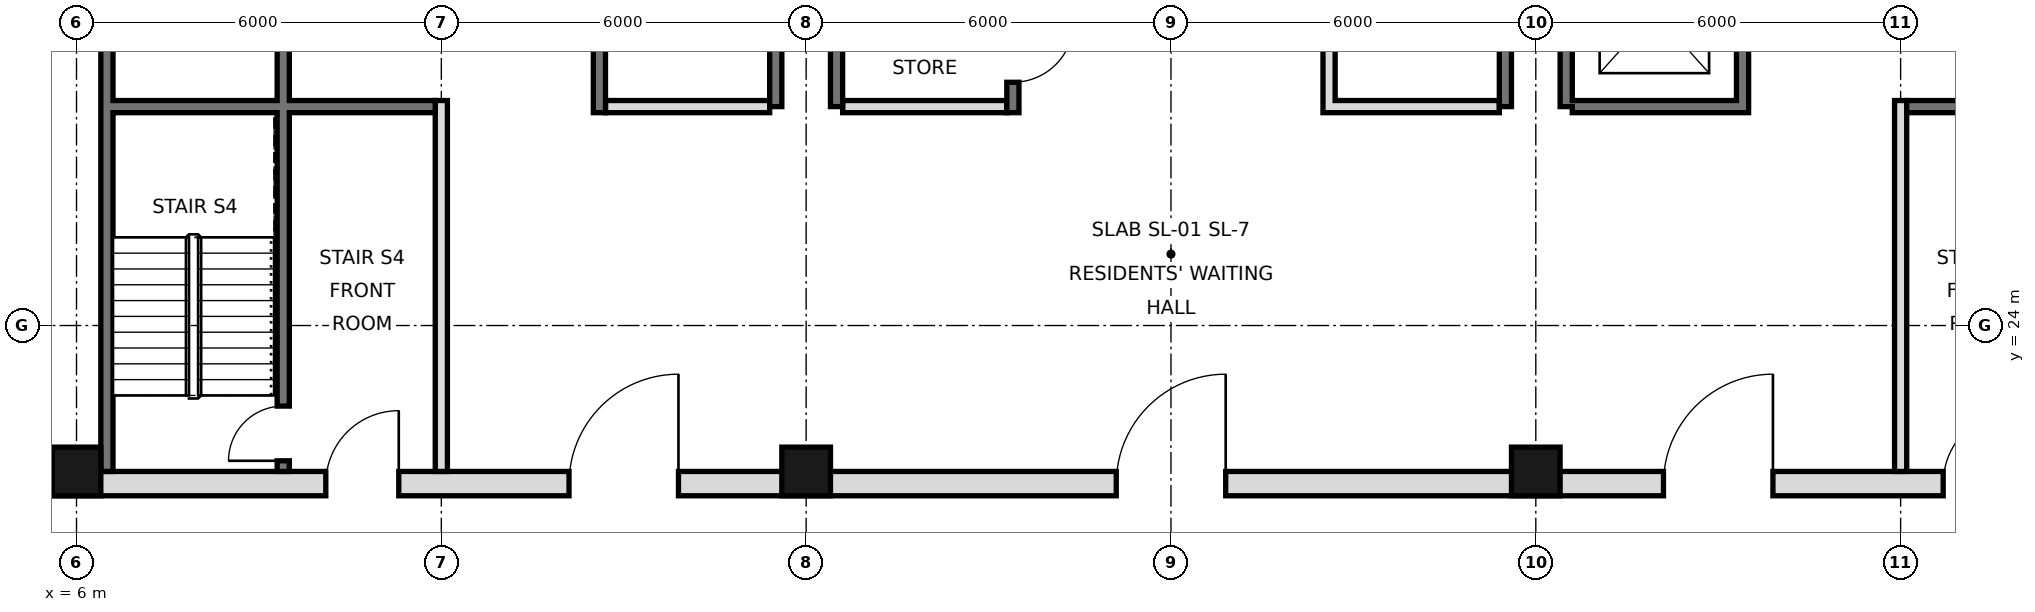
"""IFC4 building model, lengths in metres.
Left out: names, types, materials, properties, quantities, classifications, styles, units other than length and angle.
Written with IfcOpenShell. Run it as: python <this file> out.ifc"""

import sys

from ifc_helpers import new_model, si_unit, direction, frame, frame_2d, origin, origin_2d, place, context, subcontext, project, spatial, rectangle, hollow_rectangle, extrude, element, fill, save


model = new_model("IFC4")
c1 = context("Model", 3, precision=1e-05, world=origin(), true_north=direction((0.0, 1.0)))
c2 = subcontext(c1, "Body", "Model", "MODEL_VIEW")
j1 = project(units=[si_unit("LENGTHUNIT", "METRE"), si_unit("PLANEANGLEUNIT", "RADIAN")], contexts=[c1])
p1 = place(None, origin())
s1 = spatial("IfcSite", under=j1, at=p1, CompositionType="ELEMENT")
p2 = place(p1, origin())
s2 = spatial("IfcBuilding", under=s1, at=p2, CompositionType="ELEMENT")
p3 = place(p2, frame((0.0, 0.0, 298.0)))
s3 = spatial("IfcBuildingStorey", under=s2, at=p3, CompositionType="ELEMENT", Elevation=298.0)
for number, where, z_axis, x_axis in (
    (1, (6.0, 21.6, 0.0), (0.0, 0.0, 1.0), (1.0, 0.0, 0.0)),
    (2, (18.0, 21.6, 0.0), (0.0, 0.0, 1.0), (1.0, 0.0, 0.0)),
    (3, (30.0, 21.6, 0.0), (0.0, 0.0, 1.0), (1.0, 0.0, 0.0)),
):
    element("IfcColumn", number, at=place(p3, frame(where, z_axis=z_axis, x_axis=x_axis)), inside=s3, PredefinedType="COLUMN", context=c2, shape_type="SweptSolid", body=[
        extrude(hollow_rectangle(XDim=0.8, YDim=0.8, WallThickness=0.032, at=origin_2d()), origin(), (0.0, 0.0, 1.0), 3.6),
    ])
p4 = place(p3, frame((6.5, 21.6, 0.0), z_axis=(0.0, 0.0, 1.0), x_axis=(0.0, 1.0, 0.0)))
e4 = element("IfcWall", 4, at=p4, inside=s3, PredefinedType="SOLIDWALL", context=c2, shape_type="SweptSolid", body=[
    extrude(rectangle(XDim=23.5, YDim=0.2, at=frame_2d((11.75, 0.0))), origin(), (0.0, 0.0, 1.0), 3.42),
])
for number, where, z_axis, x_axis in (
    (5, (17.5, 27.6, 0.0), (0.0, 0.0, 1.0), (0.0, 1.0, 0.0)),
    (6, (18.5, 27.6, 0.0), (0.0, 0.0, 1.0), (0.0, 1.0, 0.0)),
    (7, (29.5, 27.6, 0.0), (0.0, 0.0, 1.0), (0.0, 1.0, 0.0)),
    (8, (30.5, 27.6, 0.0), (0.0, 0.0, 1.0), (0.0, 1.0, 0.0)),
):
    element("IfcWall", number, at=place(p3, frame(where, z_axis=z_axis, x_axis=x_axis)), inside=s3, PredefinedType="SOLIDWALL", context=c2, shape_type="SweptSolid", body=[
        extrude(rectangle(XDim=17.5, YDim=0.2, at=frame_2d((8.75, 0.0))), origin(), (0.0, 0.0, 1.0), 3.42),
    ])
p5 = place(p3, frame((5.6, 21.4, 0.0), z_axis=(0.0, 0.0, 1.0), x_axis=(1.0, 0.0, 0.0)))
e9 = element("IfcWall", 9, at=p5, inside=s3, PredefinedType="SOLIDWALL", context=c2, shape_type="SweptSolid", body=[
    extrude(rectangle(XDim=36.8, YDim=0.4, at=frame_2d((18.4, 0.0))), origin(), (0.0, 0.0, 1.0), 3.42),
])
p6 = place(p5, frame((8.5, 0.0, 0.0)))
e10 = element("IfcOpeningElement", 10, at=p6, cuts=e9, PredefinedType="OPENING", context=c2, shape_type="SweptSolid", body=[
    extrude(rectangle(XDim=1.8, YDim=2.1, at=frame_2d((0.9, 1.05))), frame((0.0, 0.21, 0.0), z_axis=(0.0, -1.0, 0.0), x_axis=(1.0, 0.0, 0.0)), (0.0, 0.0, 1.0), 0.42),
])
p7 = place(p5, frame((17.5, 0.0, 0.0)))
e11 = element("IfcOpeningElement", 11, at=p7, cuts=e9, PredefinedType="OPENING", context=c2, shape_type="SweptSolid", body=[
    extrude(rectangle(XDim=1.8, YDim=2.1, at=frame_2d((0.9, 1.05))), frame((0.0, 0.21, 0.0), z_axis=(0.0, -1.0, 0.0), x_axis=(1.0, 0.0, 0.0)), (0.0, 0.0, 1.0), 0.42),
])
p8 = place(p5, frame((26.5, 0.0, 0.0)))
e12 = element("IfcOpeningElement", 12, at=p8, cuts=e9, PredefinedType="OPENING", context=c2, shape_type="SweptSolid", body=[
    extrude(rectangle(XDim=1.8, YDim=2.1, at=frame_2d((0.9, 1.05))), frame((0.0, 0.21, 0.0), z_axis=(0.0, -1.0, 0.0), x_axis=(1.0, 0.0, 0.0)), (0.0, 0.0, 1.0), 0.42),
])
p9 = place(p5, frame((4.5, 0.0, 0.0)))
e13 = element("IfcOpeningElement", 13, at=p9, cuts=e9, PredefinedType="OPENING", context=c2, shape_type="SweptSolid", body=[
    extrude(rectangle(XDim=1.2, YDim=2.1, at=frame_2d((0.6, 1.05))), frame((0.0, 0.21, 0.0), z_axis=(0.0, -1.0, 0.0), x_axis=(1.0, 0.0, 0.0)), (0.0, 0.0, 1.0), 0.42),
])
p10 = place(p5, frame((31.1, 0.0, 0.0)))
e14 = element("IfcOpeningElement", 14, at=p10, cuts=e9, PredefinedType="OPENING", context=c2, shape_type="SweptSolid", body=[
    extrude(rectangle(XDim=1.2, YDim=2.1, at=frame_2d((0.6, 1.05))), frame((0.0, 0.21, 0.0), z_axis=(0.0, -1.0, 0.0), x_axis=(1.0, 0.0, 0.0)), (0.0, 0.0, 1.0), 0.42),
])
p11 = place(p3, frame((12.0, 21.6, 0.0), z_axis=(0.0, 0.0, 1.0), x_axis=(0.0, 1.0, 0.0)))
e15 = element("IfcWall", 15, at=p11, inside=s3, PredefinedType="PARTITIONING", context=c2, shape_type="SweptSolid", body=[
    extrude(rectangle(XDim=6.1, YDim=0.2, at=frame_2d((3.05, 0.0))), origin(), (0.0, 0.0, 1.0), 3.42),
])
p12 = place(p3, frame((14.6, 27.5, 0.0), z_axis=(0.0, 0.0, 1.0), x_axis=(0.0, 1.0, 0.0)))
e16 = element("IfcWall", 16, at=p12, inside=s3, PredefinedType="SOLIDWALL", context=c2, shape_type="SweptSolid", body=[
    extrude(rectangle(XDim=17.5, YDim=0.2, at=frame_2d((8.75, 0.0))), origin(), (0.0, 0.0, 1.0), 3.42),
])
p13 = place(p12, frame((15.4, 0.0, 0.0)))
e17 = element("IfcOpeningElement", 17, at=p13, cuts=e16, PredefinedType="OPENING", context=c2, shape_type="SweptSolid", body=[
    extrude(rectangle(XDim=1.1, YDim=2.1, at=frame_2d((0.55, 1.05))), frame((0.0, 0.11, 0.0), z_axis=(0.0, -1.0, 0.0), x_axis=(1.0, 0.0, 0.0)), (0.0, 0.0, 1.0), 0.22),
])
p14 = place(p12, frame((2.7, 0.0, 0.0)))
e18 = element("IfcOpeningElement", 18, at=p14, cuts=e16, PredefinedType="OPENING", context=c2, shape_type="SweptSolid", body=[
    extrude(rectangle(XDim=1.0, YDim=2.1, at=frame_2d((0.5, 1.05))), frame((0.0, 0.11, 0.0), z_axis=(0.0, -1.0, 0.0), x_axis=(1.0, 0.0, 0.0)), (0.0, 0.0, 1.0), 0.22),
])
p15 = place(p12, frame((9.9, 0.0, 0.0)))
e19 = element("IfcOpeningElement", 19, at=p15, cuts=e16, PredefinedType="OPENING", context=c2, shape_type="SweptSolid", body=[
    extrude(rectangle(XDim=0.9, YDim=2.1, at=frame_2d((0.45, 1.05))), frame((0.0, 0.11, 0.0), z_axis=(0.0, -1.0, 0.0), x_axis=(1.0, 0.0, 0.0)), (0.0, 0.0, 1.0), 0.22),
])
p16 = place(p3, frame((21.4, 27.5, 0.0), z_axis=(0.0, 0.0, 1.0), x_axis=(0.0, 1.0, 0.0)))
e20 = element("IfcWall", 20, at=p16, inside=s3, PredefinedType="SOLIDWALL", context=c2, shape_type="SweptSolid", body=[
    extrude(rectangle(XDim=17.5, YDim=0.2, at=frame_2d((8.75, 0.0))), origin(), (0.0, 0.0, 1.0), 3.42),
])
p17 = place(p16, frame((0.5, 0.0, 0.0)))
e21 = element("IfcOpeningElement", 21, at=p17, cuts=e20, PredefinedType="OPENING", context=c2, shape_type="SweptSolid", body=[
    extrude(rectangle(XDim=1.0, YDim=2.1, at=frame_2d((0.5, 1.05))), frame((0.0, 0.11, 0.0), z_axis=(0.0, -1.0, 0.0), x_axis=(1.0, 0.0, 0.0)), (0.0, 0.0, 1.0), 0.22),
])
p18 = place(p16, frame((3.6, 0.0, 0.0)))
e22 = element("IfcOpeningElement", 22, at=p18, cuts=e20, PredefinedType="OPENING", context=c2, shape_type="SweptSolid", body=[
    extrude(rectangle(XDim=1.0, YDim=2.1, at=frame_2d((0.5, 1.05))), frame((0.0, 0.11, 0.0), z_axis=(0.0, -1.0, 0.0), x_axis=(1.0, 0.0, 0.0)), (0.0, 0.0, 1.0), 0.22),
])
p19 = place(p16, frame((16.2, 0.0, 0.0)))
e23 = element("IfcOpeningElement", 23, at=p19, cuts=e20, PredefinedType="OPENING", context=c2, shape_type="SweptSolid", body=[
    extrude(rectangle(XDim=1.0, YDim=2.1, at=frame_2d((0.5, 1.05))), frame((0.0, 0.11, 0.0), z_axis=(0.0, -1.0, 0.0), x_axis=(1.0, 0.0, 0.0)), (0.0, 0.0, 1.0), 0.22),
])
p20 = place(p16, frame((7.4, 0.0, 0.0)))
e24 = element("IfcOpeningElement", 24, at=p20, cuts=e20, PredefinedType="OPENING", context=c2, shape_type="SweptSolid", body=[
    extrude(rectangle(XDim=0.9, YDim=2.1, at=frame_2d((0.45, 1.05))), frame((0.0, 0.11, 0.0), z_axis=(0.0, -1.0, 0.0), x_axis=(1.0, 0.0, 0.0)), (0.0, 0.0, 1.0), 0.22),
])
p21 = place(p3, frame((26.6, 27.5, 0.0), z_axis=(0.0, 0.0, 1.0), x_axis=(0.0, 1.0, 0.0)))
e25 = element("IfcWall", 25, at=p21, inside=s3, PredefinedType="SOLIDWALL", context=c2, shape_type="SweptSolid", body=[
    extrude(rectangle(XDim=17.5, YDim=0.2, at=frame_2d((8.75, 0.0))), origin(), (0.0, 0.0, 1.0), 3.42),
])
p22 = place(p21, frame((4.3, 0.0, 0.0)))
e26 = element("IfcOpeningElement", 26, at=p22, cuts=e25, PredefinedType="OPENING", context=c2, shape_type="SweptSolid", body=[
    extrude(rectangle(XDim=0.9, YDim=2.1, at=frame_2d((0.45, 1.05))), frame((0.0, 0.11, 0.0), z_axis=(0.0, -1.0, 0.0), x_axis=(1.0, 0.0, 0.0)), (0.0, 0.0, 1.0), 0.22),
])
p23 = place(p21, frame((10.35, 0.0, 0.0)))
e27 = element("IfcOpeningElement", 27, at=p23, cuts=e25, PredefinedType="OPENING", context=c2, shape_type="SweptSolid", body=[
    extrude(rectangle(XDim=1.0, YDim=2.1, at=frame_2d((0.5, 1.05))), frame((0.0, 0.11, 0.0), z_axis=(0.0, -1.0, 0.0), x_axis=(1.0, 0.0, 0.0)), (0.0, 0.0, 1.0), 0.22),
])
p24 = place(p21, frame((14.575, 0.0, 0.0)))
e28 = element("IfcOpeningElement", 28, at=p24, cuts=e25, PredefinedType="OPENING", context=c2, shape_type="SweptSolid", body=[
    extrude(rectangle(XDim=1.0, YDim=2.1, at=frame_2d((0.5, 1.05))), frame((0.0, 0.11, 0.0), z_axis=(0.0, -1.0, 0.0), x_axis=(1.0, 0.0, 0.0)), (0.0, 0.0, 1.0), 0.22),
])
p25 = place(p3, frame((33.4, 27.5, 0.0), z_axis=(0.0, 0.0, 1.0), x_axis=(0.0, 1.0, 0.0)))
e29 = element("IfcWall", 29, at=p25, inside=s3, PredefinedType="SOLIDWALL", context=c2, shape_type="SweptSolid", body=[
    extrude(rectangle(XDim=17.5, YDim=0.2, at=frame_2d((8.75, 0.0))), origin(), (0.0, 0.0, 1.0), 3.42),
])
p26 = place(p25, frame((1.1, 0.0, 0.0)))
e30 = element("IfcOpeningElement", 30, at=p26, cuts=e29, PredefinedType="OPENING", context=c2, shape_type="SweptSolid", body=[
    extrude(rectangle(XDim=1.1, YDim=2.1, at=frame_2d((0.55, 1.05))), frame((0.0, 0.11, 0.0), z_axis=(0.0, -1.0, 0.0), x_axis=(1.0, 0.0, 0.0)), (0.0, 0.0, 1.0), 0.22),
])
p27 = place(p25, frame((4.2, 0.0, 0.0)))
e31 = element("IfcOpeningElement", 31, at=p27, cuts=e29, PredefinedType="OPENING", context=c2, shape_type="SweptSolid", body=[
    extrude(rectangle(XDim=1.1, YDim=2.1, at=frame_2d((0.55, 1.05))), frame((0.0, 0.11, 0.0), z_axis=(0.0, -1.0, 0.0), x_axis=(1.0, 0.0, 0.0)), (0.0, 0.0, 1.0), 0.22),
])
p28 = place(p25, frame((15.4, 0.0, 0.0)))
e32 = element("IfcOpeningElement", 32, at=p28, cuts=e29, PredefinedType="OPENING", context=c2, shape_type="SweptSolid", body=[
    extrude(rectangle(XDim=1.1, YDim=2.1, at=frame_2d((0.55, 1.05))), frame((0.0, 0.11, 0.0), z_axis=(0.0, -1.0, 0.0), x_axis=(1.0, 0.0, 0.0)), (0.0, 0.0, 1.0), 0.22),
])
p29 = place(p25, frame((9.9, 0.0, 0.0)))
e33 = element("IfcOpeningElement", 33, at=p29, cuts=e29, PredefinedType="OPENING", context=c2, shape_type="SweptSolid", body=[
    extrude(rectangle(XDim=0.9, YDim=2.1, at=frame_2d((0.45, 1.05))), frame((0.0, 0.11, 0.0), z_axis=(0.0, -1.0, 0.0), x_axis=(1.0, 0.0, 0.0)), (0.0, 0.0, 1.0), 0.22),
])
p30 = place(p3, frame((36.0, 21.6, 0.0), z_axis=(0.0, 0.0, 1.0), x_axis=(0.0, 1.0, 0.0)))
e34 = element("IfcWall", 34, at=p30, inside=s3, PredefinedType="PARTITIONING", context=c2, shape_type="SweptSolid", body=[
    extrude(rectangle(XDim=6.1, YDim=0.2, at=frame_2d((3.05, 0.0))), origin(), (0.0, 0.0, 1.0), 3.42),
])
p31 = place(p3, frame((9.4, 21.6, 0.0), z_axis=(0.0, 0.0, 1.0), x_axis=(0.0, 1.0, 0.0)))
e35 = element("IfcWall", 35, at=p31, inside=s3, PredefinedType="SOLIDWALL", context=c2, shape_type="SweptSolid", body=[
    extrude(rectangle(XDim=23.4, YDim=0.2, at=frame_2d((11.7, 0.0))), origin(), (0.0, 0.0, 1.0), 3.42),
])
p32 = place(p31, frame((7.7, 0.0, 0.0)))
e36 = element("IfcOpeningElement", 36, at=p32, cuts=e35, PredefinedType="OPENING", context=c2, shape_type="SweptSolid", body=[
    extrude(rectangle(XDim=1.0, YDim=2.1, at=frame_2d((0.5, 1.05))), frame((0.0, 0.11, 0.0), z_axis=(0.0, -1.0, 0.0), x_axis=(1.0, 0.0, 0.0)), (0.0, 0.0, 1.0), 0.22),
])
p33 = place(p31, frame((12.35, 0.0, 0.0)))
e37 = element("IfcOpeningElement", 37, at=p33, cuts=e35, PredefinedType="OPENING", context=c2, shape_type="SweptSolid", body=[
    extrude(rectangle(XDim=1.0, YDim=2.1, at=frame_2d((0.5, 1.05))), frame((0.0, 0.11, 0.0), z_axis=(0.0, -1.0, 0.0), x_axis=(1.0, 0.0, 0.0)), (0.0, 0.0, 1.0), 0.22),
])
p34 = place(p31, frame((22.1, 0.0, 0.0)))
e38 = element("IfcOpeningElement", 38, at=p34, cuts=e35, PredefinedType="OPENING", context=c2, shape_type="SweptSolid", body=[
    extrude(rectangle(XDim=1.0, YDim=2.1, at=frame_2d((0.5, 1.05))), frame((0.0, 0.11, 0.0), z_axis=(0.0, -1.0, 0.0), x_axis=(1.0, 0.0, 0.0)), (0.0, 0.0, 1.0), 0.22),
])
p35 = place(p31, frame((0.175, 0.0, 0.0)))
e39 = element("IfcOpeningElement", 39, at=p35, cuts=e35, PredefinedType="OPENING", context=c2, shape_type="SweptSolid", body=[
    extrude(rectangle(XDim=0.9, YDim=2.1, at=frame_2d((0.45, 1.05))), frame((0.0, 0.11, 0.0), z_axis=(0.0, -1.0, 0.0), x_axis=(1.0, 0.0, 0.0)), (0.0, 0.0, 1.0), 0.22),
])
for number, where, z_axis, x_axis in (
    (40, (14.7, 27.6, 0.0), (0.0, 0.0, 1.0), (1.0, 0.0, 0.0)),
    (41, (18.6, 27.6, 0.0), (0.0, 0.0, 1.0), (1.0, 0.0, 0.0)),
):
    element("IfcWall", number, at=place(p3, frame(where, z_axis=z_axis, x_axis=x_axis)), inside=s3, PredefinedType="PARTITIONING", context=c2, shape_type="SweptSolid", body=[
        extrude(rectangle(XDim=2.7, YDim=0.2, at=frame_2d((1.35, 0.0))), origin(), (0.0, 0.0, 1.0), 3.42),
    ])
for number, where, z_axis, x_axis in (
    (42, (26.7, 27.6, 0.0), (0.0, 0.0, 1.0), (1.0, 0.0, 0.0)),
    (43, (30.6, 27.6, 0.0), (0.0, 0.0, 1.0), (1.0, 0.0, 0.0)),
):
    element("IfcWall", number, at=place(p3, frame(where, z_axis=z_axis, x_axis=x_axis)), inside=s3, PredefinedType="SOLIDWALL", context=c2, shape_type="SweptSolid", body=[
        extrude(rectangle(XDim=2.7, YDim=0.2, at=frame_2d((1.35, 0.0))), origin(), (0.0, 0.0, 1.0), 3.42),
    ])
for number, where, z_axis, x_axis in (
    (44, (36.1, 27.6, 0.0), (0.0, 0.0, 1.0), (1.0, 0.0, 0.0)),
    (45, (6.6, 27.6, 0.0), (0.0, 0.0, 1.0), (1.0, 0.0, 0.0)),
):
    element("IfcWall", number, at=place(p3, frame(where, z_axis=z_axis, x_axis=x_axis)), inside=s3, PredefinedType="SOLIDWALL", context=c2, shape_type="SweptSolid", body=[
        extrude(rectangle(XDim=5.3, YDim=0.2, at=frame_2d((2.65, 0.0))), origin(), (0.0, 0.0, 1.0), 3.42),
    ])
p36 = place(p6, frame((1.8, 0.0, 0.0), z_axis=(0.0, 0.0, 1.0), x_axis=(-1.0, 0.0, 0.0)))
e46 = element("IfcDoor", 46, at=p36, inside=s3, OperationType="SINGLE_SWING_LEFT", PredefinedType="DOOR", context=c2, shape_type="SweptSolid", body=[
    extrude(rectangle(XDim=1.8, YDim=2.1, at=frame_2d((0.9, 1.05))), frame((0.0, 0.025, 0.0), z_axis=(0.0, -1.0, 0.0), x_axis=(1.0, 0.0, 0.0)), (0.0, 0.0, 1.0), 0.05),
])
fill(e10, e46)
p37 = place(p7, frame((1.8, 0.0, 0.0), z_axis=(0.0, 0.0, 1.0), x_axis=(-1.0, 0.0, 0.0)))
e47 = element("IfcDoor", 47, at=p37, inside=s3, OperationType="SINGLE_SWING_LEFT", PredefinedType="DOOR", context=c2, shape_type="SweptSolid", body=[
    extrude(rectangle(XDim=1.8, YDim=2.1, at=frame_2d((0.9, 1.05))), frame((0.0, 0.025, 0.0), z_axis=(0.0, -1.0, 0.0), x_axis=(1.0, 0.0, 0.0)), (0.0, 0.0, 1.0), 0.05),
])
fill(e11, e47)
p38 = place(p8, frame((1.8, 0.0, 0.0), z_axis=(0.0, 0.0, 1.0), x_axis=(-1.0, 0.0, 0.0)))
e48 = element("IfcDoor", 48, at=p38, inside=s3, OperationType="SINGLE_SWING_LEFT", PredefinedType="DOOR", context=c2, shape_type="SweptSolid", body=[
    extrude(rectangle(XDim=1.8, YDim=2.1, at=frame_2d((0.9, 1.05))), frame((0.0, 0.025, 0.0), z_axis=(0.0, -1.0, 0.0), x_axis=(1.0, 0.0, 0.0)), (0.0, 0.0, 1.0), 0.05),
])
fill(e12, e48)
p39 = place(p9, frame((1.2, 0.0, 0.0), z_axis=(0.0, 0.0, 1.0), x_axis=(-1.0, 0.0, 0.0)))
e49 = element("IfcDoor", 49, at=p39, inside=s3, OperationType="SINGLE_SWING_LEFT", PredefinedType="DOOR", context=c2, shape_type="SweptSolid", body=[
    extrude(rectangle(XDim=1.2, YDim=2.1, at=frame_2d((0.6, 1.05))), frame((0.0, 0.025, 0.0), z_axis=(0.0, -1.0, 0.0), x_axis=(1.0, 0.0, 0.0)), (0.0, 0.0, 1.0), 0.05),
])
fill(e13, e49)
p40 = place(p10, frame((1.2, 0.0, 0.0), z_axis=(0.0, 0.0, 1.0), x_axis=(-1.0, 0.0, 0.0)))
e50 = element("IfcDoor", 50, at=p40, inside=s3, OperationType="SINGLE_SWING_LEFT", PredefinedType="DOOR", context=c2, shape_type="SweptSolid", body=[
    extrude(rectangle(XDim=1.2, YDim=2.1, at=frame_2d((0.6, 1.05))), frame((0.0, 0.025, 0.0), z_axis=(0.0, -1.0, 0.0), x_axis=(1.0, 0.0, 0.0)), (0.0, 0.0, 1.0), 0.05),
])
fill(e14, e50)
p41 = place(p17, origin())
e51 = element("IfcDoor", 51, at=p41, inside=s3, OperationType="SINGLE_SWING_RIGHT", PredefinedType="DOOR", context=c2, shape_type="SweptSolid", body=[
    extrude(rectangle(XDim=1.0, YDim=2.1, at=frame_2d((0.5, 1.05))), frame((0.0, 0.025, 0.0), z_axis=(0.0, -1.0, 0.0), x_axis=(1.0, 0.0, 0.0)), (0.0, 0.0, 1.0), 0.05),
])
fill(e21, e51)
p42 = place(p35, origin())
e52 = element("IfcDoor", 52, at=p42, inside=s3, OperationType="SINGLE_SWING_LEFT", PredefinedType="DOOR", context=c2, shape_type="SweptSolid", body=[
    extrude(rectangle(XDim=0.9, YDim=2.1, at=frame_2d((0.45, 1.05))), frame((0.0, 0.025, 0.0), z_axis=(0.0, -1.0, 0.0), x_axis=(1.0, 0.0, 0.0)), (0.0, 0.0, 1.0), 0.05),
])
fill(e39, e52)
save(model, sys.argv[1])
